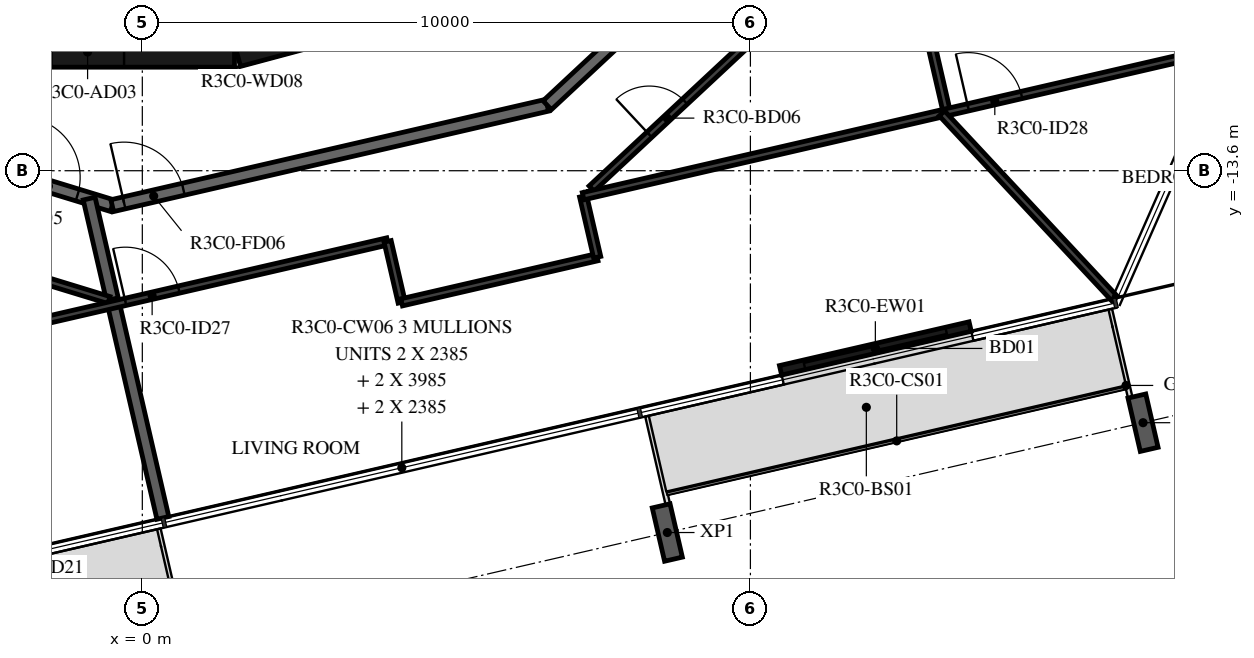
"""IFC4 building model, lengths in metres.
Left out: names, types, materials, properties, quantities, classifications, styles, units other than length and angle.
Written with IfcOpenShell. Run it as: python <this file> out.ifc"""

import sys

from ifc_helpers import new_model, si_unit, direction, frame, frame_2d, origin, origin_2d, place, context, subcontext, project, spatial, rectangle, i_section, extrude, element, fill, save


model = new_model("IFC4")
c1 = context("Model", 3, precision=1e-05, world=origin(), true_north=direction((0.0, 1.0)))
c2 = subcontext(c1, "Body", "Model", "MODEL_VIEW")
j1 = project(units=[si_unit("LENGTHUNIT", "METRE"), si_unit("PLANEANGLEUNIT", "RADIAN")], contexts=[c1])
p1 = place(None, origin())
s1 = spatial("IfcSite", under=j1, at=p1, CompositionType="ELEMENT")
p2 = place(p1, origin())
s2 = spatial("IfcBuilding", under=s1, at=p2, CompositionType="ELEMENT")
p3 = place(p2, frame((0.0, 0.0, 141.4)))
s3 = spatial("IfcBuildingStorey", under=s2, at=p3, CompositionType="ELEMENT", Elevation=141.4)
for number, where, z_axis, x_axis in (
    (1, (8.634, -19.55, -0.38), (0.0, 0.0, 1.0), (-0.974, -0.225, 0.0)),
    (2, (16.457, -17.744, -0.38), (0.0, 0.0, 1.0), (-0.974, -0.225, 0.0)),
):
    element("IfcColumn", number, at=place(p3, frame(where, z_axis=z_axis, x_axis=x_axis)), inside=s3, PredefinedType="COLUMN", context=c2, shape_type="SweptSolid", body=[
        extrude(i_section(OverallWidth=0.3, OverallDepth=0.9, WebThickness=0.019, FlangeThickness=0.035, FilletRadius=0.03, at=origin_2d()), origin(), (0.0, 0.0, 1.0), 2.616),
    ])
p4 = place(p3, frame((10.496, -16.883, 0.0), z_axis=(0.0, 0.0, 1.0), x_axis=(0.974364187477, 0.224976510247, 0.0)))
e3 = element("IfcWall", 3, at=p4, inside=s3, PredefinedType="STANDARD", context=c2, shape_type="SweptSolid", body=[
    extrude(rectangle(XDim=3.2, YDim=0.16, at=frame_2d((1.6, 0.0))), origin(), (0.0, 0.0, 1.0), 3.05),
])
p5 = place(p4, frame((0.4, 0.0, 0.0)))
e4 = element("IfcOpeningElement", 4, at=p5, cuts=e3, PredefinedType="OPENING", context=c2, shape_type="SweptSolid", body=[
    extrude(rectangle(XDim=2.4, YDim=2.4, at=frame_2d((1.2, 1.2))), frame((0.0, 0.09, 0.0), z_axis=(0.0, -1.0, 0.0), x_axis=(1.0, 0.0, 0.0)), (0.0, 0.0, 1.0), 0.18),
])
p6 = place(p3, frame((1.55, -11.643, 0.0), z_axis=(0.0, 0.0, 1.0), x_axis=(0.965948410781, 0.258734743916, 0.0)))
e5 = element("IfcWall", 5, at=p6, inside=s3, PredefinedType="SHEAR", context=c2, shape_type="SweptSolid", body=[
    extrude(rectangle(XDim=3.033, YDim=0.5, at=frame_2d((1.516, 0.0))), origin(), (0.0, 0.0, 1.0), 3.05),
])
p7 = place(p6, frame((1.066, 0.0, 0.0)))
e6 = element("IfcOpeningElement", 6, at=p7, cuts=e5, PredefinedType="OPENING", context=c2, shape_type="SweptSolid", body=[
    extrude(rectangle(XDim=0.9, YDim=2.1, at=frame_2d((0.45, 1.05))), frame((0.0, 0.26, 0.0), z_axis=(0.0, -1.0, 0.0), x_axis=(1.0, 0.0, 0.0)), (0.0, 0.0, 1.0), 0.52),
])
p8 = place(p3, frame((-1.516, -11.647, 0.0), z_axis=(0.0, 0.0, 1.0), x_axis=(1.0, 0.0, 0.0)))
e7 = element("IfcWall", 7, at=p8, inside=s3, PredefinedType="SHEAR", context=c2, shape_type="SweptSolid", body=[
    extrude(rectangle(XDim=3.033, YDim=0.5, at=frame_2d((1.516, 0.0))), origin(), (0.0, 0.0, 1.0), 3.05),
])
p9 = place(p8, frame((0.016, 0.0, 0.0)))
e8 = element("IfcOpeningElement", 8, at=p9, cuts=e7, PredefinedType="OPENING", context=c2, shape_type="SweptSolid", body=[
    extrude(rectangle(XDim=1.2, YDim=2.1, at=frame_2d((0.6, 1.05))), frame((0.0, 0.26, 0.0), z_axis=(0.0, -1.0, 0.0), x_axis=(1.0, 0.0, 0.0)), (0.0, 0.0, 1.0), 0.52),
])
p10 = place(p3, frame((-7.516, -12.028, 0.0), z_axis=(0.0, 0.0, 1.0), x_axis=(0.956306642771, -0.292365533182, 0.0)))
e9 = element("IfcWall", 9, at=p10, inside=s3, PredefinedType="STANDARD", context=c2, shape_type="SweptSolid", body=[
    extrude(rectangle(XDim=7.342, YDim=0.2, at=frame_2d((3.671, 0.0))), origin(), (0.0, 0.0, 1.0), 3.05),
])
p11 = place(p10, frame((5.745, 0.0, 0.0)))
e10 = element("IfcOpeningElement", 10, at=p11, cuts=e9, PredefinedType="OPENING", context=c2, shape_type="SweptSolid", body=[
    extrude(rectangle(XDim=1.0, YDim=2.1, at=frame_2d((0.5, 1.05))), frame((0.0, 0.11, 0.0), z_axis=(0.0, -1.0, 0.0), x_axis=(1.0, 0.0, 0.0)), (0.0, 0.0, 1.0), 0.22),
])
p12 = place(p3, frame((-0.495, -14.175, 0.0), z_axis=(0.0, 0.0, 1.0), x_axis=(0.974376622151, 0.224922649383, 0.0)))
e11 = element("IfcWall", 11, at=p12, inside=s3, PredefinedType="STANDARD", context=c2, shape_type="SweptSolid", body=[
    extrude(rectangle(XDim=7.342, YDim=0.2, at=frame_2d((3.671, 0.0))), origin(), (0.0, 0.0, 1.0), 3.05),
])
p13 = place(p12, frame((0.2, 0.0, 0.0)))
e12 = element("IfcOpeningElement", 12, at=p13, cuts=e11, PredefinedType="OPENING", context=c2, shape_type="SweptSolid", body=[
    extrude(rectangle(XDim=1.0, YDim=2.1, at=frame_2d((0.5, 1.05))), frame((0.0, 0.11, 0.0), z_axis=(0.0, -1.0, 0.0), x_axis=(1.0, 0.0, 0.0)), (0.0, 0.0, 1.0), 0.22),
])
p14 = place(p3, frame((6.659, -12.523, 0.0), z_axis=(0.0, 0.0, 1.0), x_axis=(0.731350455479, 0.682001841105, 0.0)))
e13 = element("IfcWall", 13, at=p14, inside=s3, PredefinedType="STANDARD", context=c2, shape_type="SweptSolid", body=[
    extrude(rectangle(XDim=7.342, YDim=0.2, at=frame_2d((3.671, 0.0))), origin(), (0.0, 0.0, 1.0), 3.05),
])
p15 = place(p3, frame((-0.492, -15.713, 0.0), z_axis=(0.0, 0.0, 1.0), x_axis=(-0.224974992875, 0.97436453783, 0.0)))
e14 = element("IfcWall", 14, at=p15, inside=s3, PredefinedType="STANDARD", context=c2, shape_type="SweptSolid", body=[
    extrude(rectangle(XDim=1.698, YDim=0.2, at=frame_2d((0.849, 0.0))), origin(), (0.0, 0.0, 1.0), 3.05),
])
p16 = place(p3, frame((0.338, -19.31, 0.0), z_axis=(0.0, 0.0, 1.0), x_axis=(-0.224943703639, 0.9743717618, 0.0)))
e15 = element("IfcWall", 15, at=p16, inside=s3, PredefinedType="STANDARD", context=c2, shape_type="SweptSolid", body=[
    extrude(rectangle(XDim=3.6, YDim=0.2, at=frame_2d((1.8, 0.0))), origin(), (0.0, 0.0, 1.0), 3.05),
])
p17 = place(p3, frame((-7.804, -13.509, 0.0), z_axis=(0.0, 0.0, 1.0), x_axis=(0.956309088343, -0.292357533772, 0.0)))
e16 = element("IfcWall", 16, at=p17, inside=s3, PredefinedType="PARTITIONING", context=c2, shape_type="SweptSolid", body=[
    extrude(rectangle(XDim=7.586, YDim=0.12, at=frame_2d((3.793, 0.0))), origin(), (0.0, 0.0, 1.0), 3.05),
])
p18 = place(p17, frame((1.006, 0.0, 0.0)))
e17 = element("IfcOpeningElement", 17, at=p18, cuts=e16, PredefinedType="OPENING", context=c2, shape_type="SweptSolid", body=[
    extrude(rectangle(XDim=0.8, YDim=2.1, at=frame_2d((0.4, 1.05))), frame((0.0, 0.07, 0.0), z_axis=(0.0, -1.0, 0.0), x_axis=(1.0, 0.0, 0.0)), (0.0, 0.0, 1.0), 0.14),
])
p19 = place(p3, frame((-14.736, -19.095, 0.0), z_axis=(0.0, 0.0, 1.0), x_axis=(0.974368335243, 0.224958545682, 0.0)))
e18 = element("IfcWall", 18, at=p19, inside=s3, PredefinedType="PARTITIONING", context=c2, shape_type="SweptSolid", body=[
    extrude(rectangle(XDim=19.263, YDim=0.12, at=frame_2d((9.632, 0.0))), origin(), (0.0, 0.0, 1.0), 3.05),
])
p20 = place(p19, frame((2.993, 0.0, 0.0)))
e19 = element("IfcOpeningElement", 19, at=p20, cuts=e18, PredefinedType="OPENING", context=c2, shape_type="SweptSolid", body=[
    extrude(rectangle(XDim=0.9, YDim=2.1, at=frame_2d((0.45, 1.05))), frame((0.0, 0.07, 0.0), z_axis=(0.0, -1.0, 0.0), x_axis=(1.0, 0.0, 0.0)), (0.0, 0.0, 1.0), 0.14),
])
p21 = place(p19, frame((6.81, 0.0, 0.0)))
e20 = element("IfcOpeningElement", 20, at=p21, cuts=e18, PredefinedType="OPENING", context=c2, shape_type="SweptSolid", body=[
    extrude(rectangle(XDim=0.9, YDim=2.1, at=frame_2d((0.45, 1.05))), frame((0.0, 0.07, 0.0), z_axis=(0.0, -1.0, 0.0), x_axis=(1.0, 0.0, 0.0)), (0.0, 0.0, 1.0), 0.14),
])
p22 = place(p19, frame((0.2, 0.0, 0.0)))
e21 = element("IfcOpeningElement", 21, at=p22, cuts=e18, PredefinedType="OPENING", context=c2, shape_type="SweptSolid", body=[
    extrude(rectangle(XDim=0.9, YDim=2.1, at=frame_2d((0.45, 1.05))), frame((0.0, 0.07, 0.0), z_axis=(0.0, -1.0, 0.0), x_axis=(1.0, 0.0, 0.0)), (0.0, 0.0, 1.0), 0.14),
])
p23 = place(p19, frame((14.839, 0.0, 0.0)))
e22 = element("IfcOpeningElement", 22, at=p23, cuts=e18, PredefinedType="OPENING", context=c2, shape_type="SweptSolid", body=[
    extrude(rectangle(XDim=0.9, YDim=2.1, at=frame_2d((0.45, 1.05))), frame((0.0, 0.07, 0.0), z_axis=(0.0, -1.0, 0.0), x_axis=(1.0, 0.0, 0.0)), (0.0, 0.0, 1.0), 0.14),
])
p24 = place(p3, frame((4.034, -14.762, 0.0), z_axis=(0.0, 0.0, 1.0), x_axis=(0.224859506699, -0.974391195695, 0.0)))
e23 = element("IfcWall", 23, at=p24, inside=s3, PredefinedType="PARTITIONING", context=c2, shape_type="SweptSolid", body=[
    extrude(rectangle(XDim=1.029, YDim=0.12, at=frame_2d((0.515, 0.0))), origin(), (0.0, 0.0, 1.0), 3.05),
])
p25 = place(p3, frame((4.265, -15.765, 0.0), z_axis=(0.0, 0.0, 1.0), x_axis=(0.974382467056, 0.22489732745, 0.0)))
e24 = element("IfcWall", 24, at=p25, inside=s3, PredefinedType="PARTITIONING", context=c2, shape_type="SweptSolid", body=[
    extrude(rectangle(XDim=3.3, YDim=0.12, at=frame_2d((1.65, 0.0))), origin(), (0.0, 0.0, 1.0), 3.05),
])
p26 = place(p3, frame((7.481, -15.022, 0.0), z_axis=(0.0, 0.0, 1.0), x_axis=(-0.225084689316, 0.974339203068, 0.0)))
e25 = element("IfcWall", 25, at=p26, inside=s3, PredefinedType="PARTITIONING", context=c2, shape_type="SweptSolid", body=[
    extrude(rectangle(XDim=1.029, YDim=0.12, at=frame_2d((0.515, 0.0))), origin(), (0.0, 0.0, 1.0), 3.05),
])
p27 = place(p3, frame((7.388, -13.894, 0.0), z_axis=(0.0, 0.0, 1.0), x_axis=(0.731339966659, 0.682013088707, 0.0)))
e26 = element("IfcWall", 26, at=p27, inside=s3, PredefinedType="PARTITIONING", context=c2, shape_type="SweptSolid", body=[
    extrude(rectangle(XDim=6.899, YDim=0.12, at=frame_2d((3.45, 0.0))), origin(), (0.0, 0.0, 1.0), 3.05),
])
p28 = place(p27, frame((1.3, 0.0, 0.0)))
e27 = element("IfcOpeningElement", 27, at=p28, cuts=e26, PredefinedType="OPENING", context=c2, shape_type="SweptSolid", body=[
    extrude(rectangle(XDim=0.8, YDim=2.1, at=frame_2d((0.4, 1.05))), frame((0.0, 0.07, 0.0), z_axis=(0.0, -1.0, 0.0), x_axis=(1.0, 0.0, 0.0)), (0.0, 0.0, 1.0), 0.14),
])
p29 = place(p3, frame((12.434, -9.189, 0.0), z_axis=(0.0, 0.0, 1.0), x_axis=(0.224924972887, -0.974376085796, 0.0)))
e28 = element("IfcWall", 28, at=p29, inside=s3, PredefinedType="PARTITIONING", context=c2, shape_type="SweptSolid", body=[
    extrude(rectangle(XDim=3.541, YDim=0.12, at=frame_2d((1.771, 0.0))), origin(), (0.0, 0.0, 1.0), 3.05),
])
p30 = place(p3, frame((7.249, -14.02, 0.0), z_axis=(0.0, 0.0, 1.0), x_axis=(0.974369514697, 0.224953437023, 0.0)))
e29 = element("IfcWall", 29, at=p30, inside=s3, PredefinedType="PARTITIONING", context=c2, shape_type="SweptSolid", body=[
    extrude(rectangle(XDim=12.149, YDim=0.12, at=frame_2d((6.074, 0.0))), origin(), (0.0, 0.0, 1.0), 3.05),
])
p31 = place(p30, frame((6.498, 0.0, 0.0)))
e30 = element("IfcOpeningElement", 30, at=p31, cuts=e29, PredefinedType="OPENING", context=c2, shape_type="SweptSolid", body=[
    extrude(rectangle(XDim=0.9, YDim=2.1, at=frame_2d((0.45, 1.05))), frame((0.0, 0.07, 0.0), z_axis=(0.0, -1.0, 0.0), x_axis=(1.0, 0.0, 0.0)), (0.0, 0.0, 1.0), 0.14),
])
p32 = place(p3, frame((15.985, -15.698, 0.0), z_axis=(0.0, 0.0, 1.0), x_axis=(-0.681979185924, 0.731371581322, 0.0)))
e31 = element("IfcWall", 31, at=p32, inside=s3, PredefinedType="PARTITIONING", context=c2, shape_type="SweptSolid", body=[
    extrude(rectangle(XDim=4.157, YDim=0.12, at=frame_2d((2.079, 0.0))), origin(), (0.0, 0.0, 1.0), 3.05),
])
p33 = place(p5, origin())
e32 = element("IfcDoor", 32, at=p33, inside=s3, OperationType="DOUBLE_DOOR_SLIDING", PredefinedType="DOOR", context=c2, shape_type="SweptSolid", body=[
    extrude(rectangle(XDim=2.4, YDim=2.4, at=frame_2d((1.2, 1.2))), frame((0.0, 0.025, 0.0), z_axis=(0.0, -1.0, 0.0), x_axis=(1.0, 0.0, 0.0)), (0.0, 0.0, 1.0), 0.05),
])
fill(e4, e32)
p34 = place(p9, origin())
e33 = element("IfcDoor", 33, at=p34, inside=s3, OperationType="SINGLE_SWING_RIGHT", PredefinedType="DOOR", context=c2, shape_type="SweptSolid", body=[
    extrude(rectangle(XDim=1.2, YDim=2.1, at=frame_2d((0.6, 1.05))), frame((0.0, 0.025, 0.0), z_axis=(0.0, -1.0, 0.0), x_axis=(1.0, 0.0, 0.0)), (0.0, 0.0, 1.0), 0.05),
])
fill(e8, e33)
p35 = place(p11, origin())
e34 = element("IfcDoor", 34, at=p35, inside=s3, OperationType="SINGLE_SWING_LEFT", PredefinedType="DOOR", context=c2, shape_type="SweptSolid", body=[
    extrude(rectangle(XDim=1.0, YDim=2.1, at=frame_2d((0.5, 1.05))), frame((0.0, 0.025, 0.0), z_axis=(0.0, -1.0, 0.0), x_axis=(1.0, 0.0, 0.0)), (0.0, 0.0, 1.0), 0.05),
])
fill(e10, e34)
p36 = place(p13, origin())
e35 = element("IfcDoor", 35, at=p36, inside=s3, OperationType="SINGLE_SWING_LEFT", PredefinedType="DOOR", context=c2, shape_type="SweptSolid", body=[
    extrude(rectangle(XDim=1.0, YDim=2.1, at=frame_2d((0.5, 1.05))), frame((0.0, 0.025, 0.0), z_axis=(0.0, -1.0, 0.0), x_axis=(1.0, 0.0, 0.0)), (0.0, 0.0, 1.0), 0.05),
])
fill(e12, e35)
p37 = place(p23, origin())
e36 = element("IfcDoor", 36, at=p37, inside=s3, OperationType="SINGLE_SWING_LEFT", PredefinedType="DOOR", context=c2, shape_type="SweptSolid", body=[
    extrude(rectangle(XDim=0.9, YDim=2.1, at=frame_2d((0.45, 1.05))), frame((0.0, 0.025, 0.0), z_axis=(0.0, -1.0, 0.0), x_axis=(1.0, 0.0, 0.0)), (0.0, 0.0, 1.0), 0.05),
])
fill(e22, e36)
p38 = place(p28, origin())
e37 = element("IfcDoor", 37, at=p38, inside=s3, OperationType="SINGLE_SWING_RIGHT", PredefinedType="DOOR", context=c2, shape_type="SweptSolid", body=[
    extrude(rectangle(XDim=0.8, YDim=2.1, at=frame_2d((0.4, 1.05))), frame((0.0, 0.025, 0.0), z_axis=(0.0, -1.0, 0.0), x_axis=(1.0, 0.0, 0.0)), (0.0, 0.0, 1.0), 0.05),
])
fill(e27, e37)
p39 = place(p31, origin())
e38 = element("IfcDoor", 38, at=p39, inside=s3, OperationType="SINGLE_SWING_RIGHT", PredefinedType="DOOR", context=c2, shape_type="SweptSolid", body=[
    extrude(rectangle(XDim=0.9, YDim=2.1, at=frame_2d((0.45, 1.05))), frame((0.0, 0.025, 0.0), z_axis=(0.0, -1.0, 0.0), x_axis=(1.0, 0.0, 0.0)), (0.0, 0.0, 1.0), 0.05),
])
fill(e30, e38)
save(model, sys.argv[1])
